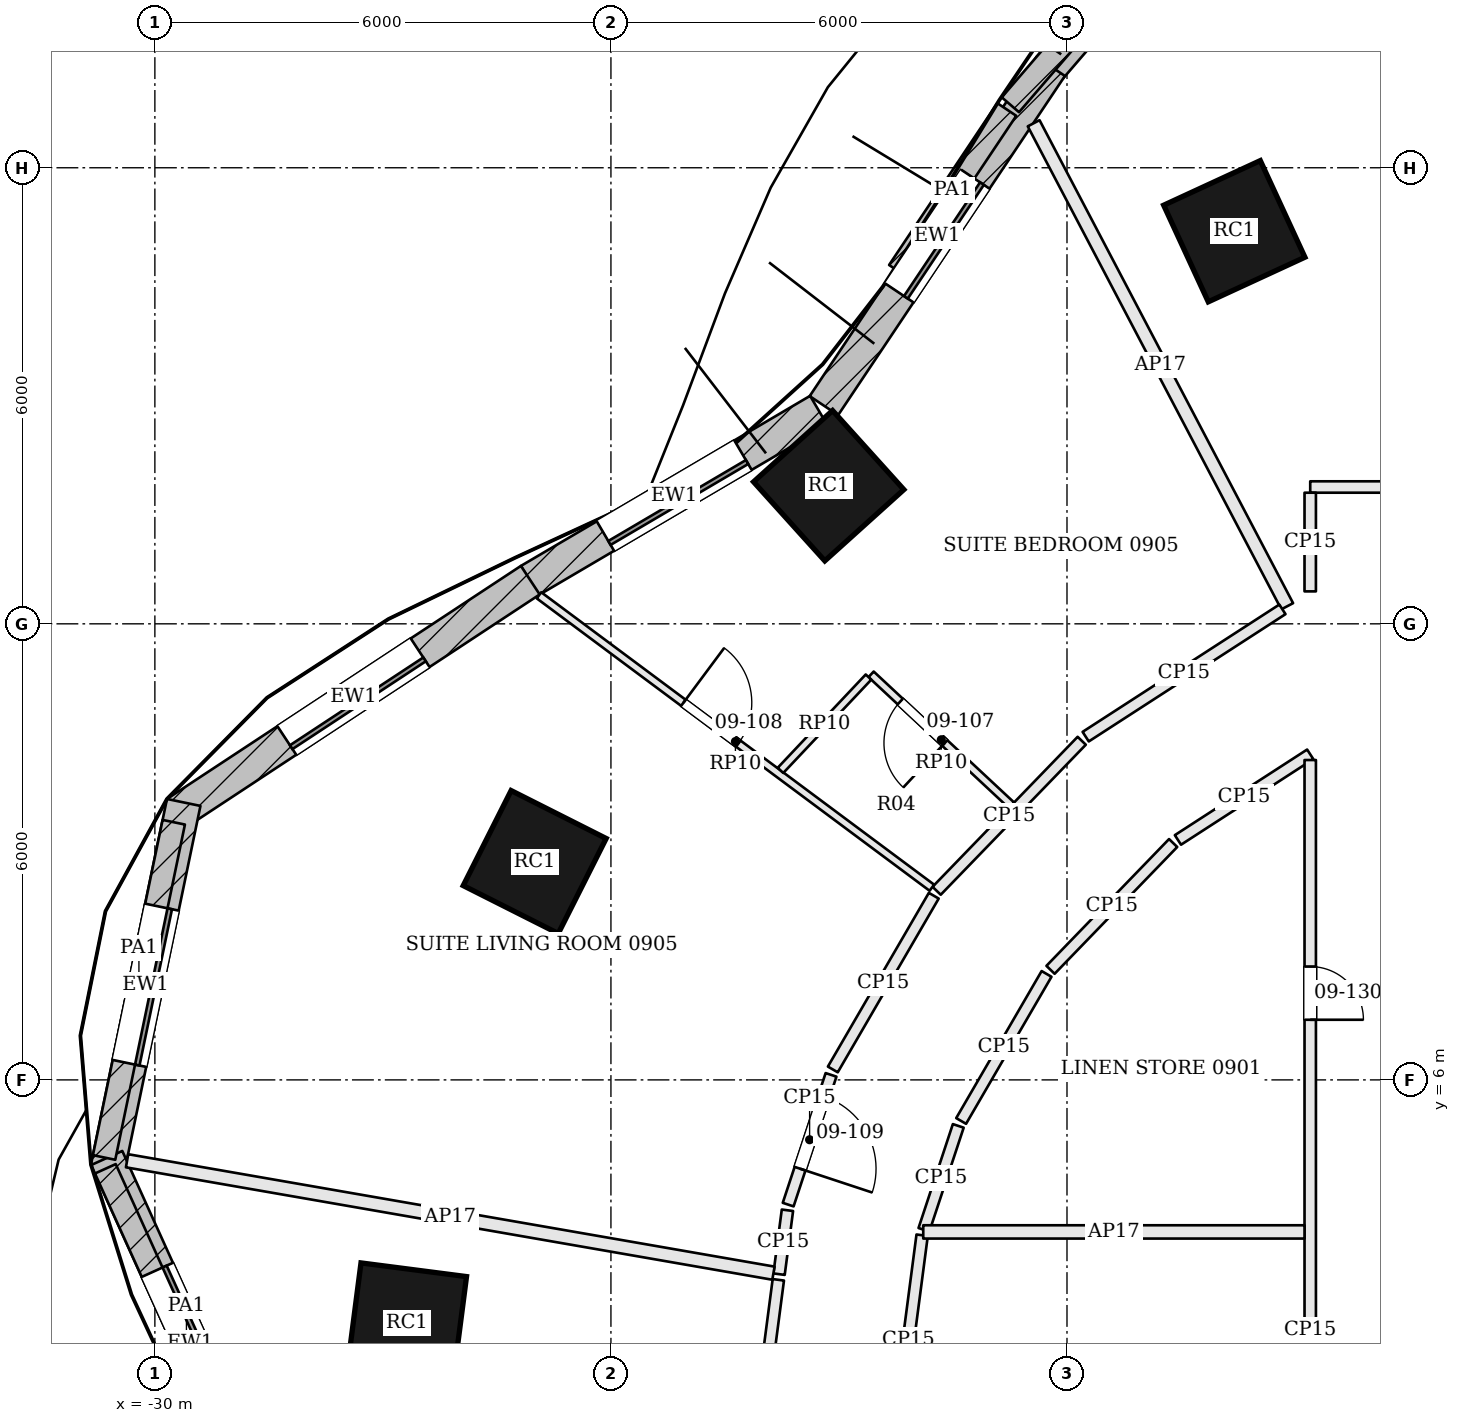
"""IFC4 building model, lengths in metres.
Left out: names, types, materials, properties, quantities, classifications, styles, units other than length and angle.
Written with IfcOpenShell. Run it as: python <this file> out.ifc"""

import sys

from ifc_helpers import new_model, si_unit, direction, frame, frame_2d, origin, origin_2d, place, context, subcontext, project, spatial, rectangle, extrude, element, fill, save


model = new_model("IFC4")
c1 = context("Model", 3, precision=1e-05, world=origin(), true_north=direction((0.0, 1.0)))
c2 = subcontext(c1, "Body", "Model", "MODEL_VIEW")
j1 = project(units=[si_unit("LENGTHUNIT", "METRE"), si_unit("PLANEANGLEUNIT", "RADIAN")], contexts=[c1])
p1 = place(None, origin())
s1 = spatial("IfcSite", under=j1, at=p1, CompositionType="ELEMENT")
p2 = place(p1, origin())
s2 = spatial("IfcBuilding", under=s1, at=p2, CompositionType="ELEMENT")
p3 = place(p2, frame((0.0, 0.0, 48.3)))
s3 = spatial("IfcBuildingStorey", under=s2, at=p3, CompositionType="ELEMENT", Elevation=48.3)
for number, where, z_axis, x_axis in (
    (1, (-15.799, 17.165, 0.0), (0.0, 0.0, 1.0), (-0.908, -0.419, 0.0)),
    (2, (-21.135, 13.817, 0.0), (0.0, 0.0, 1.0), (-0.743, -0.67, 0.0)),
    (3, (-25.003, 8.866, 0.0), (0.0, 0.0, 1.0), (-0.45, -0.893, 0.0)),
    (4, (-26.684, 2.808, 0.0), (0.0, 0.0, 1.0), (-0.128, -0.992, 0.0)),
):
    element("IfcColumn", number, at=place(p3, frame(where, z_axis=z_axis, x_axis=x_axis)), inside=s3, PredefinedType="COLUMN", context=c2, shape_type="SweptSolid", body=[
        extrude(rectangle(XDim=1.4, YDim=1.4, at=origin_2d()), origin(), (0.0, 0.0, 1.0), 3.6),
    ])
p4 = place(p3, frame((-15.919, 21.999, 0.0), z_axis=(0.0, 0.0, 1.0), x_axis=(-0.652009971272, -0.758210391225, 0.0)))
e5 = element("IfcWall", 5, at=p4, inside=s3, PredefinedType="SOLIDWALL", context=c2, shape_type="SweptSolid", body=[
    extrude(rectangle(XDim=3.545, YDim=0.45, at=frame_2d((1.772, 0.0))), origin(), (0.0, 0.0, 1.0), 3.4),
])
p5 = place(p4, frame((0.722, 0.0, 0.9)))
e6 = element("IfcOpeningElement", 6, at=p5, cuts=e5, PredefinedType="OPENING", context=c2, shape_type="SweptSolid", body=[
    extrude(rectangle(XDim=2.1, YDim=2.0, at=frame_2d((1.05, 1.0))), frame((0.0, 0.235, 0.0), z_axis=(0.0, -1.0, 0.0), x_axis=(1.0, 0.0, 0.0)), (0.0, 0.0, 1.0), 0.47),
])
p6 = place(p3, frame((-18.214, 19.333, 0.0), z_axis=(0.0, 0.0, 1.0), x_axis=(-0.555833135316, -0.831293886471, 0.0)))
e7 = element("IfcWall", 7, at=p6, inside=s3, PredefinedType="SOLIDWALL", context=c2, shape_type="SweptSolid", body=[
    extrude(rectangle(XDim=5.368, YDim=0.45, at=frame_2d((2.684, 0.0))), origin(), (0.0, 0.0, 1.0), 3.4),
])
p7 = place(p6, frame((1.784, 0.0, 0.9)))
e8 = element("IfcOpeningElement", 8, at=p7, cuts=e7, PredefinedType="OPENING", context=c2, shape_type="SweptSolid", body=[
    extrude(rectangle(XDim=1.8, YDim=2.0, at=frame_2d((0.9, 1.0))), frame((0.0, 0.235, 0.0), z_axis=(0.0, -1.0, 0.0), x_axis=(1.0, 0.0, 0.0)), (0.0, 0.0, 1.0), 0.47),
])
p8 = place(p3, frame((-21.266, 14.805, 0.0), z_axis=(0.0, 0.0, 1.0), x_axis=(-0.861975457737, -0.506950007653, 0.0)))
e9 = element("IfcWall", 9, at=p8, inside=s3, PredefinedType="SOLIDWALL", context=c2, shape_type="SweptSolid", body=[
    extrude(rectangle(XDim=4.413, YDim=0.45, at=frame_2d((2.207, 0.0))), origin(), (0.0, 0.0, 1.0), 3.4),
])
p9 = place(p8, frame((1.156, 0.0, 0.9)))
e10 = element("IfcOpeningElement", 10, at=p9, cuts=e9, PredefinedType="OPENING", context=c2, shape_type="SweptSolid", body=[
    extrude(rectangle(XDim=2.1, YDim=2.0, at=frame_2d((1.05, 1.0))), frame((0.0, 0.235, 0.0), z_axis=(0.0, -1.0, 0.0), x_axis=(1.0, 0.0, 0.0)), (0.0, 0.0, 1.0), 0.47),
])
p10 = place(p3, frame((-25.061, 12.574, 0.0), z_axis=(0.0, 0.0, 1.0), x_axis=(-0.83520622102, -0.549936876714, 0.0)))
e11 = element("IfcWall", 11, at=p10, inside=s3, PredefinedType="SOLIDWALL", context=c2, shape_type="SweptSolid", body=[
    extrude(rectangle(XDim=5.57, YDim=0.45, at=frame_2d((2.785, 0.0))), origin(), (0.0, 0.0, 1.0), 3.4),
])
p11 = place(p10, frame((1.735, 0.0, 0.9)))
e12 = element("IfcOpeningElement", 12, at=p11, cuts=e11, PredefinedType="OPENING", context=c2, shape_type="SweptSolid", body=[
    extrude(rectangle(XDim=2.1, YDim=2.0, at=frame_2d((1.05, 1.0))), frame((0.0, 0.235, 0.0), z_axis=(0.0, -1.0, 0.0), x_axis=(1.0, 0.0, 0.0)), (0.0, 0.0, 1.0), 0.47),
])
p12 = place(p3, frame((-29.621, 9.65, 0.0), z_axis=(0.0, 0.0, 1.0), x_axis=(-0.203505836306, -0.979073732969, 0.0)))
e13 = element("IfcWall", 13, at=p12, inside=s3, PredefinedType="SOLIDWALL", context=c2, shape_type="SweptSolid", body=[
    extrude(rectangle(XDim=4.914, YDim=0.45, at=frame_2d((2.457, 0.0))), origin(), (0.0, 0.0, 1.0), 3.4),
])
p13 = place(p12, frame((1.407, 0.0, 0.9)))
e14 = element("IfcOpeningElement", 14, at=p13, cuts=e13, PredefinedType="OPENING", context=c2, shape_type="SweptSolid", body=[
    extrude(rectangle(XDim=2.1, YDim=2.0, at=frame_2d((1.05, 1.0))), frame((0.0, 0.235, 0.0), z_axis=(0.0, -1.0, 0.0), x_axis=(1.0, 0.0, 0.0)), (0.0, 0.0, 1.0), 0.47),
])
p14 = place(p3, frame((-30.634, 4.972, 0.0), z_axis=(0.0, 0.0, 1.0), x_axis=(0.412494644758, -0.910960025493, 0.0)))
e15 = element("IfcWall", 15, at=p14, inside=s3, PredefinedType="SOLIDWALL", context=c2, shape_type="SweptSolid", body=[
    extrude(rectangle(XDim=5.33, YDim=0.45, at=frame_2d((2.665, 0.0))), origin(), (0.0, 0.0, 1.0), 3.4),
])
p15 = place(p14, frame((1.615, 0.0, 0.9)))
e16 = element("IfcOpeningElement", 16, at=p15, cuts=e15, PredefinedType="OPENING", context=c2, shape_type="SweptSolid", body=[
    extrude(rectangle(XDim=2.1, YDim=2.0, at=frame_2d((1.05, 1.0))), frame((0.0, 0.235, 0.0), z_axis=(0.0, -1.0, 0.0), x_axis=(1.0, 0.0, 0.0)), (0.0, 0.0, 1.0), 0.47),
])
p16 = place(p3, frame((-18.076, 19.492, 0.0), z_axis=(0.0, 0.0, 1.0), x_axis=(-0.822618823872, 0.568593238274, 0.0)))
e17 = element("IfcWall", 17, at=p16, inside=s3, PredefinedType="SOLIDWALL", context=c2, shape_type="SweptSolid", body=[
    extrude(rectangle(XDim=1.75, YDim=0.2, at=frame_2d((0.875, 0.0))), origin(), (0.0, 0.0, 1.0), 3.4),
])
p17 = place(p3, frame((-16.056, 21.956, 3.6), z_axis=(0.0, 0.0, 1.0), x_axis=(-0.652038588201, -0.75818578165, 0.0)))
e18 = element("IfcWall", 18, at=p17, inside=s3, PredefinedType="PARAPET", context=c2, shape_type="SweptSolid", body=[
    extrude(rectangle(XDim=4.124, YDim=0.3, at=frame_2d((2.062, 0.0))), origin(), (0.0, 0.0, 1.0), 1.1),
])
p18 = place(p3, frame((-18.792, 18.767, 3.6), z_axis=(0.0, 0.0, 1.0), x_axis=(-0.555843382853, -0.831287034507, 0.0)))
e19 = element("IfcWall", 19, at=p18, inside=s3, PredefinedType="PARAPET", context=c2, shape_type="SweptSolid", body=[
    extrude(rectangle(XDim=2.562, YDim=0.3, at=frame_2d((1.281, 0.0))), origin(), (0.0, 0.0, 1.0), 1.1),
])
p19 = place(p3, frame((-29.751, 9.39, 3.6), z_axis=(0.0, 0.0, 1.0), x_axis=(-0.203510555438, -0.97907275206, 0.0)))
e20 = element("IfcWall", 20, at=p19, inside=s3, PredefinedType="PARAPET", context=c2, shape_type="SweptSolid", body=[
    extrude(rectangle(XDim=4.505, YDim=0.3, at=frame_2d((2.252, 0.0))), origin(), (0.0, 0.0, 1.0), 1.1),
])
p20 = place(p3, frame((-30.652, 4.83, 3.6), z_axis=(0.0, 0.0, 1.0), x_axis=(0.412522333553, -0.910947487136, 0.0)))
e21 = element("IfcWall", 21, at=p20, inside=s3, PredefinedType="PARAPET", context=c2, shape_type="SweptSolid", body=[
    extrude(rectangle(XDim=5.173, YDim=0.3, at=frame_2d((2.586, 0.0))), origin(), (0.0, 0.0, 1.0), 1.1),
])
p21 = place(p3, frame((-11.464, 13.8, 0.0), z_axis=(0.0, 0.0, 1.0), x_axis=(-1.0, 0.0, 0.0)))
e22 = element("IfcWall", 22, at=p21, inside=s3, PredefinedType="PARTITIONING", context=c2, shape_type="SweptSolid", body=[
    extrude(rectangle(XDim=3.336, YDim=0.15, at=frame_2d((1.668, 0.0))), origin(), (0.0, 0.0, 1.0), 2.68),
])
p22 = place(p3, frame((-14.8, 13.725, 0.0), z_axis=(0.0, 0.0, 1.0), x_axis=(-0.000188040613, -0.99999998232, 0.0)))
e23 = element("IfcWall", 23, at=p22, inside=s3, PredefinedType="PARTITIONING", context=c2, shape_type="SweptSolid", body=[
    extrude(rectangle(XDim=1.298, YDim=0.15, at=frame_2d((0.649, 0.0))), origin(), (0.0, 0.0, 1.0), 2.68),
])
p23 = place(p3, frame((-18.439, 18.586, 0.0), z_axis=(0.0, 0.0, 1.0), x_axis=(0.464815231758, -0.885407702884, 0.0)))
e24 = element("IfcWall", 24, at=p23, inside=s3, PredefinedType="PARTITIONING", context=c2, shape_type="SweptSolid", body=[
    extrude(rectangle(XDim=7.177, YDim=0.175, at=frame_2d((3.588, 0.0))), origin(), (0.0, 0.0, 1.0), 2.68),
])
p24 = place(p3, frame((-15.166, 12.19, 0.0), z_axis=(0.0, 0.0, 1.0), x_axis=(-0.839538287855, -0.54330052754, 0.0)))
e25 = element("IfcWall", 25, at=p24, inside=s3, PredefinedType="PARTITIONING", context=c2, shape_type="SweptSolid", body=[
    extrude(rectangle(XDim=3.083, YDim=0.15, at=frame_2d((1.542, 0.0))), origin(), (0.0, 0.0, 1.0), 2.68),
])
p25 = place(p3, frame((-17.806, 10.462, 0.0), z_axis=(0.0, 0.0, 1.0), x_axis=(-0.695227375123, -0.71878988368, 0.0)))
e26 = element("IfcWall", 26, at=p25, inside=s3, PredefinedType="PARTITIONING", context=c2, shape_type="SweptSolid", body=[
    extrude(rectangle(XDim=2.746, YDim=0.15, at=frame_2d((1.373, 0.0))), origin(), (0.0, 0.0, 1.0), 2.68),
])
p26 = place(p3, frame((-19.753, 8.423, 0.0), z_axis=(0.0, 0.0, 1.0), x_axis=(-0.502411766486, -0.864628484898, 0.0)))
e27 = element("IfcWall", 27, at=p26, inside=s3, PredefinedType="PARTITIONING", context=c2, shape_type="SweptSolid", body=[
    extrude(rectangle(XDim=2.644, YDim=0.15, at=frame_2d((1.322, 0.0))), origin(), (0.0, 0.0, 1.0), 2.68),
])
p27 = place(p3, frame((-21.104, 6.066, 0.0), z_axis=(0.0, 0.0, 1.0), x_axis=(-0.313700743044, -0.949521902756, 0.0)))
e28 = element("IfcWall", 28, at=p27, inside=s3, PredefinedType="PARTITIONING", context=c2, shape_type="SweptSolid", body=[
    extrude(rectangle(XDim=1.798, YDim=0.15, at=frame_2d((0.899, 0.0))), origin(), (0.0, 0.0, 1.0), 2.68),
])
p28 = place(p27, frame((0.3, 0.0, 0.0)))
e29 = element("IfcOpeningElement", 29, at=p28, cuts=e28, PredefinedType="OPENING", context=c2, shape_type="SweptSolid", body=[
    extrude(rectangle(XDim=1.0, YDim=2.1, at=frame_2d((0.5, 1.05))), frame((0.0, 0.085, 0.0), z_axis=(0.0, -1.0, 0.0), x_axis=(1.0, 0.0, 0.0)), (0.0, 0.0, 1.0), 0.17),
])
p29 = place(p3, frame((-21.678, 4.285, 0.0), z_axis=(0.0, 0.0, 1.0), x_axis=(-0.129917972145, -0.991524745286, 0.0)))
e30 = element("IfcWall", 30, at=p29, inside=s3, PredefinedType="PARTITIONING", context=c2, shape_type="SweptSolid", body=[
    extrude(rectangle(XDim=0.847, YDim=0.15, at=frame_2d((0.424, 0.0))), origin(), (0.0, 0.0, 1.0), 2.68),
])
p30 = place(p3, frame((-30.366, 4.936, 0.0), z_axis=(0.0, 0.0, 1.0), x_axis=(0.985210509232, -0.171348336728, 0.0)))
e31 = element("IfcWall", 31, at=p30, inside=s3, PredefinedType="PARTITIONING", context=c2, shape_type="SweptSolid", body=[
    extrude(rectangle(XDim=8.632, YDim=0.175, at=frame_2d((4.316, 0.0))), origin(), (0.0, 0.0, 1.0), 2.68),
])
p31 = place(p3, frame((-21.798, 3.37, 0.0), z_axis=(0.0, 0.0, 1.0), x_axis=(-0.130032209746, -0.991509770213, 0.0)))
e32 = element("IfcWall", 32, at=p31, inside=s3, PredefinedType="PARTITIONING", context=c2, shape_type="SweptSolid", body=[
    extrude(rectangle(XDim=2.154, YDim=0.15, at=frame_2d((1.077, 0.0))), origin(), (0.0, 0.0, 1.0), 2.68),
])
p32 = place(p3, frame((-20.265, 1.211, 0.0), z_axis=(0.0, 0.0, 1.0), x_axis=(0.129957307165, 0.991519590484, 0.0)))
e33 = element("IfcWall", 33, at=p32, inside=s3, PredefinedType="PARTITIONING", context=c2, shape_type="SweptSolid", body=[
    extrude(rectangle(XDim=2.769, YDim=0.15, at=frame_2d((1.385, 0.0))), origin(), (0.0, 0.0, 1.0), 2.68),
])
p33 = place(p3, frame((-19.882, 4.028, 0.0), z_axis=(0.0, 0.0, 1.0), x_axis=(0.313632756375, 0.949544361327, 0.0)))
e34 = element("IfcWall", 34, at=p33, inside=s3, PredefinedType="PARTITIONING", context=c2, shape_type="SweptSolid", body=[
    extrude(rectangle(XDim=1.44, YDim=0.15, at=frame_2d((0.72, 0.0))), origin(), (0.0, 0.0, 1.0), 2.68),
])
p34 = place(p3, frame((-19.393, 5.46, 0.0), z_axis=(0.0, 0.0, 1.0), x_axis=(0.502296094562, 0.864695688314, 0.0)))
e35 = element("IfcWall", 35, at=p34, inside=s3, PredefinedType="PARTITIONING", context=c2, shape_type="SweptSolid", body=[
    extrude(rectangle(XDim=2.237, YDim=0.15, at=frame_2d((1.119, 0.0))), origin(), (0.0, 0.0, 1.0), 2.68),
])
p35 = place(p3, frame((-18.217, 7.448, 0.0), z_axis=(0.0, 0.0, 1.0), x_axis=(0.695172542355, 0.718842914938, 0.0)))
e36 = element("IfcWall", 36, at=p35, inside=s3, PredefinedType="PARTITIONING", context=c2, shape_type="SweptSolid", body=[
    extrude(rectangle(XDim=2.321, YDim=0.15, at=frame_2d((1.16, 0.0))), origin(), (0.0, 0.0, 1.0), 2.68),
])
p36 = place(p3, frame((-16.54, 9.157, 0.0), z_axis=(0.0, 0.0, 1.0), x_axis=(0.839529075717, 0.543314762385, 0.0)))
e37 = element("IfcWall", 37, at=p36, inside=s3, PredefinedType="PARTITIONING", context=c2, shape_type="SweptSolid", body=[
    extrude(rectangle(XDim=2.073, YDim=0.15, at=frame_2d((1.036, 0.0))), origin(), (0.0, 0.0, 1.0), 2.68),
])
p37 = place(p3, frame((-14.8, 10.208, 0.0), z_axis=(0.0, 0.0, 1.0), x_axis=(0.0, -1.0, 0.0)))
e38 = element("IfcWall", 38, at=p37, inside=s3, PredefinedType="PARTITIONING", context=c2, shape_type="SweptSolid", body=[
    extrude(rectangle(XDim=15.008, YDim=0.15, at=frame_2d((7.504, 0.0))), origin(), (0.0, 0.0, 1.0), 2.68),
])
p38 = place(p37, frame((2.717, 0.0, 0.0)))
e39 = element("IfcOpeningElement", 39, at=p38, cuts=e38, PredefinedType="OPENING", context=c2, shape_type="SweptSolid", body=[
    extrude(rectangle(XDim=0.7, YDim=2.1, at=frame_2d((0.35, 1.05))), frame((0.0, 0.085, 0.0), z_axis=(0.0, -1.0, 0.0), x_axis=(1.0, 0.0, 0.0)), (0.0, 0.0, 1.0), 0.17),
])
p39 = place(p37, frame((9.708, 0.0, 0.0)))
e40 = element("IfcOpeningElement", 40, at=p39, cuts=e38, PredefinedType="OPENING", context=c2, shape_type="SweptSolid", body=[
    extrude(rectangle(XDim=1.0, YDim=2.1, at=frame_2d((0.5, 1.05))), frame((0.0, 0.085, 0.0), z_axis=(0.0, -1.0, 0.0), x_axis=(1.0, 0.0, 0.0)), (0.0, 0.0, 1.0), 0.17),
])
p40 = place(p3, frame((-24.946, 12.375, 0.0), z_axis=(0.0, 0.0, 1.0), x_axis=(0.802204519976, -0.597049334754, 0.0)))
e41 = element("IfcWall", 41, at=p40, inside=s3, PredefinedType="PARTITIONING", context=c2, shape_type="SweptSolid", body=[
    extrude(rectangle(XDim=6.443, YDim=0.1, at=frame_2d((3.221, 0.0))), origin(), (0.0, 0.0, 1.0), 2.934),
])
p41 = place(p40, frame((2.368, 0.0, 0.0)))
e42 = element("IfcOpeningElement", 42, at=p41, cuts=e41, PredefinedType="OPENING", context=c2, shape_type="SweptSolid", body=[
    extrude(rectangle(XDim=0.9, YDim=2.4, at=frame_2d((0.45, 1.2))), frame((0.0, 0.06, 0.0), z_axis=(0.0, -1.0, 0.0), x_axis=(1.0, 0.0, 0.0)), (0.0, 0.0, 1.0), 0.12),
])
p42 = place(p3, frame((-18.731, 9.614, 0.0), z_axis=(0.0, 0.0, 1.0), x_axis=(-0.731286737376, 0.682070163354, 0.0)))
e43 = element("IfcWall", 43, at=p42, inside=s3, PredefinedType="PARTITIONING", context=c2, shape_type="SweptSolid", body=[
    extrude(rectangle(XDim=2.525, YDim=0.1, at=frame_2d((1.262, 0.0))), origin(), (0.0, 0.0, 1.0), 2.934),
])
p43 = place(p42, frame((1.2, 0.0, 0.0)))
e44 = element("IfcOpeningElement", 44, at=p43, cuts=e43, PredefinedType="OPENING", context=c2, shape_type="SweptSolid", body=[
    extrude(rectangle(XDim=0.8, YDim=2.1, at=frame_2d((0.4, 1.05))), frame((0.0, 0.06, 0.0), z_axis=(0.0, -1.0, 0.0), x_axis=(1.0, 0.0, 0.0)), (0.0, 0.0, 1.0), 0.12),
])
p44 = place(p3, frame((-20.612, 11.299, 0.0), z_axis=(0.0, 0.0, 1.0), x_axis=(-0.686181414116, -0.727430455041, 0.0)))
e45 = element("IfcWall", 45, at=p44, inside=s3, PredefinedType="PARTITIONING", context=c2, shape_type="SweptSolid", body=[
    extrude(rectangle(XDim=1.687, YDim=0.1, at=frame_2d((0.843, 0.0))), origin(), (0.0, 0.0, 1.0), 2.934),
])
p45 = place(p3, frame((-19.891, 4.0, 0.0), z_axis=(0.0, 0.0, 1.0), x_axis=(1.0, 0.0, 0.0)))
e46 = element("IfcWall", 46, at=p45, inside=s3, PredefinedType="PARTITIONING", context=c2, shape_type="SweptSolid", body=[
    extrude(rectangle(XDim=5.016, YDim=0.175, at=frame_2d((2.508, 0.0))), origin(), (0.0, 0.0, 1.0), 2.68),
])
p46 = place(p7, origin())
e47 = element("IfcWindow", 47, at=p46, inside=s3, PartitioningType="SINGLE_PANEL", PredefinedType="WINDOW", context=c2, shape_type="SweptSolid", body=[
    extrude(rectangle(XDim=1.8, YDim=2.0, at=frame_2d((0.9, 1.0))), frame((0.0, 0.135, 0.0), z_axis=(0.0, -1.0, 0.0), x_axis=(1.0, 0.0, 0.0)), (0.0, 0.0, 1.0), 0.06),
])
fill(e8, e47)
p47 = place(p9, origin())
e48 = element("IfcWindow", 48, at=p47, inside=s3, PartitioningType="SINGLE_PANEL", PredefinedType="WINDOW", context=c2, shape_type="SweptSolid", body=[
    extrude(rectangle(XDim=2.1, YDim=2.0, at=frame_2d((1.05, 1.0))), frame((0.0, 0.135, 0.0), z_axis=(0.0, -1.0, 0.0), x_axis=(1.0, 0.0, 0.0)), (0.0, 0.0, 1.0), 0.06),
])
fill(e10, e48)
p48 = place(p11, origin())
e49 = element("IfcWindow", 49, at=p48, inside=s3, PartitioningType="SINGLE_PANEL", PredefinedType="WINDOW", context=c2, shape_type="SweptSolid", body=[
    extrude(rectangle(XDim=2.1, YDim=2.0, at=frame_2d((1.05, 1.0))), frame((0.0, 0.135, 0.0), z_axis=(0.0, -1.0, 0.0), x_axis=(1.0, 0.0, 0.0)), (0.0, 0.0, 1.0), 0.06),
])
fill(e12, e49)
p49 = place(p13, origin())
e50 = element("IfcWindow", 50, at=p49, inside=s3, PartitioningType="SINGLE_PANEL", PredefinedType="WINDOW", context=c2, shape_type="SweptSolid", body=[
    extrude(rectangle(XDim=2.1, YDim=2.0, at=frame_2d((1.05, 1.0))), frame((0.0, 0.135, 0.0), z_axis=(0.0, -1.0, 0.0), x_axis=(1.0, 0.0, 0.0)), (0.0, 0.0, 1.0), 0.06),
])
fill(e14, e50)
p50 = place(p15, origin())
e51 = element("IfcWindow", 51, at=p50, inside=s3, PartitioningType="SINGLE_PANEL", PredefinedType="WINDOW", context=c2, shape_type="SweptSolid", body=[
    extrude(rectangle(XDim=2.1, YDim=2.0, at=frame_2d((1.05, 1.0))), frame((0.0, 0.135, 0.0), z_axis=(0.0, -1.0, 0.0), x_axis=(1.0, 0.0, 0.0)), (0.0, 0.0, 1.0), 0.06),
])
fill(e16, e51)
p51 = place(p43, origin())
e52 = element("IfcDoor", 52, at=p51, inside=s3, OperationType="SINGLE_SWING_LEFT", PredefinedType="DOOR", context=c2, shape_type="SweptSolid", body=[
    extrude(rectangle(XDim=0.8, YDim=2.1, at=frame_2d((0.4, 1.05))), frame((0.0, 0.025, 0.0), z_axis=(0.0, -1.0, 0.0), x_axis=(1.0, 0.0, 0.0)), (0.0, 0.0, 1.0), 0.05),
])
fill(e44, e52)
p52 = place(p41, origin())
e53 = element("IfcDoor", 53, at=p52, inside=s3, OperationType="SINGLE_SWING_LEFT", PredefinedType="DOOR", context=c2, shape_type="SweptSolid", body=[
    extrude(rectangle(XDim=0.9, YDim=2.4, at=frame_2d((0.45, 1.2))), frame((0.0, 0.025, 0.0), z_axis=(0.0, -1.0, 0.0), x_axis=(1.0, 0.0, 0.0)), (0.0, 0.0, 1.0), 0.05),
])
fill(e42, e53)
p53 = place(p28, origin())
e54 = element("IfcDoor", 54, at=p53, inside=s3, OperationType="SINGLE_SWING_RIGHT", PredefinedType="DOOR", context=c2, shape_type="SweptSolid", body=[
    extrude(rectangle(XDim=1.0, YDim=2.1, at=frame_2d((0.5, 1.05))), frame((0.0, 0.025, 0.0), z_axis=(0.0, -1.0, 0.0), x_axis=(1.0, 0.0, 0.0)), (0.0, 0.0, 1.0), 0.05),
])
fill(e29, e54)
p54 = place(p38, origin())
e55 = element("IfcDoor", 55, at=p54, inside=s3, OperationType="SINGLE_SWING_RIGHT", PredefinedType="DOOR", context=c2, shape_type="SweptSolid", body=[
    extrude(rectangle(XDim=0.7, YDim=2.1, at=frame_2d((0.35, 1.05))), frame((0.0, 0.025, 0.0), z_axis=(0.0, -1.0, 0.0), x_axis=(1.0, 0.0, 0.0)), (0.0, 0.0, 1.0), 0.05),
])
fill(e39, e55)
save(model, sys.argv[1])
